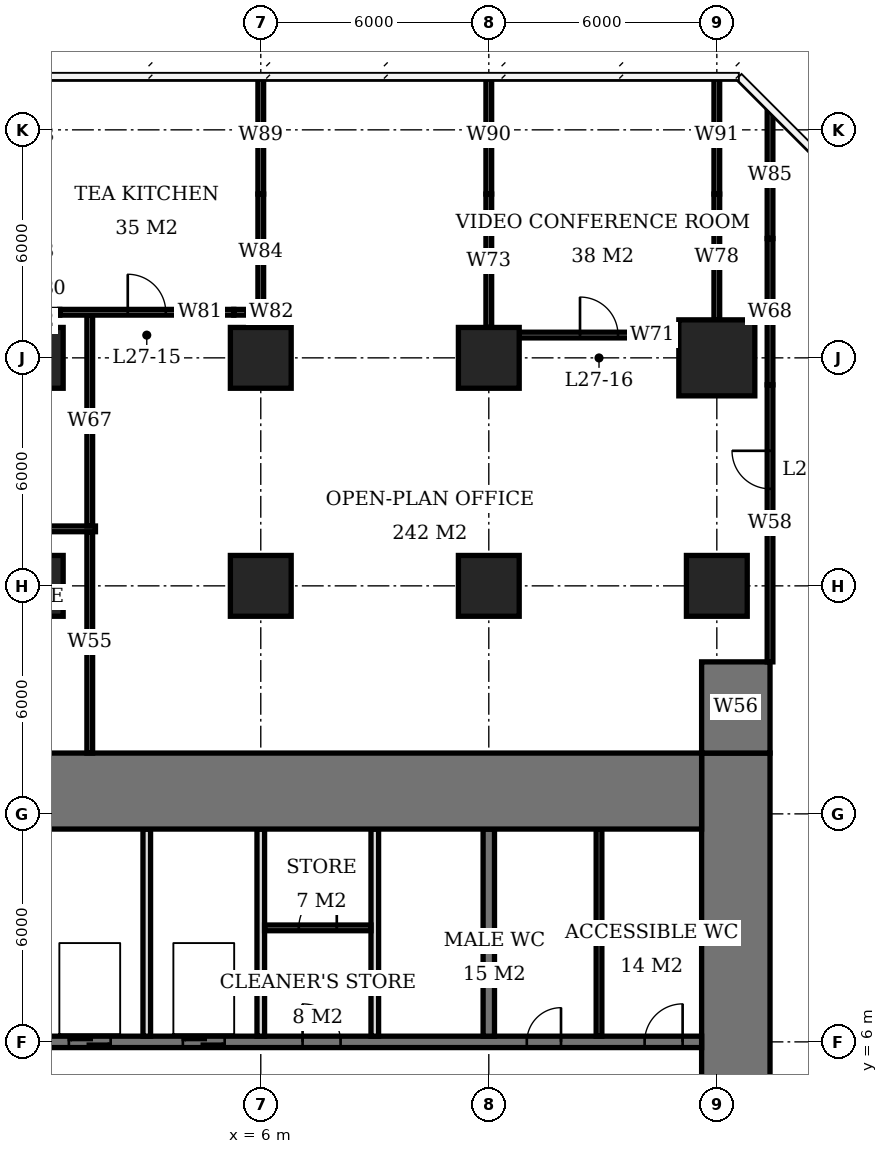
"""IFC4 building model, lengths in metres.
Left out: names, types, materials, properties, quantities, classifications, styles, units other than length and angle.
Written with IfcOpenShell. Run it as: python <this file> out.ifc"""

import sys

from ifc_helpers import new_model, si_unit, direction, frame, frame_2d, origin, origin_2d, place, context, subcontext, project, spatial, rectangle, extrude, element, fill, save


model = new_model("IFC4")
c1 = context("Model", 3, precision=1e-05, world=origin(), true_north=direction((0.0, 1.0)))
c2 = subcontext(c1, "Body", "Model", "MODEL_VIEW")
j1 = project(units=[si_unit("LENGTHUNIT", "METRE"), si_unit("PLANEANGLEUNIT", "RADIAN")], contexts=[c1])
p1 = place(None, origin())
s1 = spatial("IfcSite", under=j1, at=p1, CompositionType="ELEMENT")
p2 = place(p1, origin())
s2 = spatial("IfcBuilding", under=s1, at=p2, CompositionType="ELEMENT")
p3 = place(p2, frame((0.0, 0.0, 113.3)))
s3 = spatial("IfcBuildingStorey", under=s2, at=p3, CompositionType="ELEMENT", Elevation=113.3)
for number, where, z_axis, x_axis in (
    (1, (0.0, 18.0, 0.0), (0.0, 0.0, 1.0), (1.0, 0.0, 0.0)),
    (2, (0.0, 24.0, 0.0), (0.0, 0.0, 1.0), (1.0, 0.0, 0.0)),
    (3, (6.0, 18.0, 0.0), (0.0, 0.0, 1.0), (1.0, 0.0, 0.0)),
    (4, (6.0, 24.0, 0.0), (0.0, 0.0, 1.0), (1.0, 0.0, 0.0)),
    (5, (12.0, 18.0, 0.0), (0.0, 0.0, 1.0), (1.0, 0.0, 0.0)),
    (6, (12.0, 24.0, 0.0), (0.0, 0.0, 1.0), (1.0, 0.0, 0.0)),
    (7, (18.0, 18.0, 0.0), (0.0, 0.0, 1.0), (1.0, 0.0, 0.0)),
):
    element("IfcColumn", number, at=place(p3, frame(where, z_axis=z_axis, x_axis=x_axis)), inside=s3, PredefinedType="COLUMN", context=c2, shape_type="SweptSolid", body=[
        extrude(rectangle(XDim=1.6, YDim=1.6, at=origin_2d()), origin(), (0.0, 0.0, 1.0), 3.9),
    ])
p4 = place(p3, frame((18.0, 24.0, 0.0), z_axis=(0.0, 0.0, 1.0), x_axis=(1.0, 0.0, 0.0)))
e8 = element("IfcColumn", 8, at=p4, inside=s3, PredefinedType="COLUMN", context=c2, shape_type="SweptSolid", body=[
    extrude(rectangle(XDim=2.0, YDim=2.0, at=origin_2d()), origin(), (0.0, 0.0, 1.0), 3.9),
])
p5 = place(p3, frame((-5.6, 12.6, 0.0), z_axis=(0.0, 0.0, 1.0), x_axis=(1.0, 0.0, 0.0)))
e9 = element("IfcWall", 9, at=p5, inside=s3, PredefinedType="SHEAR", context=c2, shape_type="SweptSolid", body=[
    extrude(rectangle(XDim=23.2, YDim=2.0, at=frame_2d((11.6, 0.0))), origin(), (0.0, 0.0, 1.0), 3.9),
])
p6 = place(p3, frame((18.5, -7.6, 0.0), z_axis=(0.0, 0.0, 1.0), x_axis=(0.0, 1.0, 0.0)))
e10 = element("IfcWall", 10, at=p6, inside=s3, PredefinedType="SHEAR", context=c2, shape_type="SweptSolid", body=[
    extrude(rectangle(XDim=21.2, YDim=1.8, at=frame_2d((10.6, 0.0))), origin(), (0.0, 0.0, 1.0), 3.9),
])
p7 = place(p6, frame((9.2, 0.0, 0.0)))
e11 = element("IfcOpeningElement", 11, at=p7, cuts=e10, PredefinedType="OPENING", context=c2, shape_type="SweptSolid", body=[
    extrude(rectangle(XDim=1.8, YDim=2.4, at=frame_2d((0.9, 1.2))), frame((0.0, 0.91, 0.0), z_axis=(0.0, -1.0, 0.0), x_axis=(1.0, 0.0, 0.0)), (0.0, 0.0, 1.0), 1.82),
])
p8 = place(p3, frame((18.5, 13.6, 0.0), z_axis=(0.0, 0.0, 1.0), x_axis=(0.0, 1.0, 0.0)))
e12 = element("IfcWall", 12, at=p8, inside=s3, PredefinedType="SHEAR", context=c2, shape_type="SweptSolid", body=[
    extrude(rectangle(XDim=2.4, YDim=1.8, at=frame_2d((1.2, 0.0))), origin(), (0.0, 0.0, 1.0), 3.9),
])
p9 = place(p3, frame((-0.15, 6.0, 0.0), z_axis=(0.0, 0.0, 1.0), x_axis=(1.0, 0.0, 0.0)))
e13 = element("IfcWall", 13, at=p9, inside=s3, PredefinedType="SHEAR", context=c2, shape_type="SweptSolid", body=[
    extrude(rectangle(XDim=17.75, YDim=0.3, at=frame_2d((8.875, 0.0))), origin(), (0.0, 0.0, 1.0), 3.9),
])
p10 = place(p9, frame((13.15, 0.0, 0.0)))
e14 = element("IfcOpeningElement", 14, at=p10, cuts=e13, PredefinedType="OPENING", context=c2, shape_type="SweptSolid", body=[
    extrude(rectangle(XDim=0.9, YDim=2.1, at=frame_2d((0.45, 1.05))), frame((0.0, 0.16, 0.0), z_axis=(0.0, -1.0, 0.0), x_axis=(1.0, 0.0, 0.0)), (0.0, 0.0, 1.0), 0.32),
])
p11 = place(p9, frame((16.25, 0.0, 0.0)))
e15 = element("IfcOpeningElement", 15, at=p11, cuts=e13, PredefinedType="OPENING", context=c2, shape_type="SweptSolid", body=[
    extrude(rectangle(XDim=1.0, YDim=2.1, at=frame_2d((0.5, 1.05))), frame((0.0, 0.16, 0.0), z_axis=(0.0, -1.0, 0.0), x_axis=(1.0, 0.0, 0.0)), (0.0, 0.0, 1.0), 0.32),
])
p12 = place(p9, frame((7.25, 0.0, 0.0)))
e16 = element("IfcOpeningElement", 16, at=p12, cuts=e13, PredefinedType="OPENING", context=c2, shape_type="SweptSolid", body=[
    extrude(rectangle(XDim=1.0, YDim=2.1, at=frame_2d((0.5, 1.05))), frame((0.0, 0.16, 0.0), z_axis=(0.0, -1.0, 0.0), x_axis=(1.0, 0.0, 0.0)), (0.0, 0.0, 1.0), 0.32),
])
p13 = place(p9, frame((1.1, 0.0, 0.0)))
e17 = element("IfcOpeningElement", 17, at=p13, cuts=e13, PredefinedType="OPENING", context=c2, shape_type="SweptSolid", body=[
    extrude(rectangle(XDim=1.1, YDim=2.1, at=frame_2d((0.55, 1.05))), frame((0.0, 0.16, 0.0), z_axis=(0.0, -1.0, 0.0), x_axis=(1.0, 0.0, 0.0)), (0.0, 0.0, 1.0), 0.32),
])
p14 = place(p9, frame((4.1, 0.0, 0.0)))
e18 = element("IfcOpeningElement", 18, at=p14, cuts=e13, PredefinedType="OPENING", context=c2, shape_type="SweptSolid", body=[
    extrude(rectangle(XDim=1.1, YDim=2.1, at=frame_2d((0.55, 1.05))), frame((0.0, 0.16, 0.0), z_axis=(0.0, -1.0, 0.0), x_axis=(1.0, 0.0, 0.0)), (0.0, 0.0, 1.0), 0.32),
])
p15 = place(p3, frame((12.0, 6.15, 0.0), z_axis=(0.0, 0.0, 1.0), x_axis=(0.0, 1.0, 0.0)))
e19 = element("IfcWall", 19, at=p15, inside=s3, PredefinedType="SHEAR", context=c2, shape_type="SweptSolid", body=[
    extrude(rectangle(XDim=5.45, YDim=0.3, at=frame_2d((2.725, 0.0))), origin(), (0.0, 0.0, 1.0), 3.9),
])
for number, where, z_axis, x_axis in (
    (20, (3.0, 6.15, 0.0), (0.0, 0.0, 1.0), (0.0, 1.0, 0.0)),
    (21, (6.0, 6.15, 0.0), (0.0, 0.0, 1.0), (0.0, 1.0, 0.0)),
    (22, (9.0, 6.15, 0.0), (0.0, 0.0, 1.0), (0.0, 1.0, 0.0)),
):
    element("IfcWall", number, at=place(p3, frame(where, z_axis=z_axis, x_axis=x_axis)), inside=s3, PredefinedType="SOLIDWALL", context=c2, shape_type="SweptSolid", body=[
        extrude(rectangle(XDim=5.45, YDim=0.2, at=frame_2d((2.725, 0.0))), origin(), (0.0, 0.0, 1.0), 3.9),
    ])
p16 = place(p3, frame((14.9, 6.15, 0.0), z_axis=(0.0, 0.0, 1.0), x_axis=(0.0, 1.0, 0.0)))
e23 = element("IfcWall", 23, at=p16, inside=s3, PredefinedType="PLUMBINGWALL", context=c2, shape_type="SweptSolid", body=[
    extrude(rectangle(XDim=5.45, YDim=0.15, at=frame_2d((2.725, 0.0))), origin(), (0.0, 0.0, 1.0), 3.65),
])
p17 = place(p3, frame((6.1, 9.0, 0.0), z_axis=(0.0, 0.0, 1.0), x_axis=(1.0, 0.0, 0.0)))
e24 = element("IfcWall", 24, at=p17, inside=s3, PredefinedType="PARTITIONING", context=c2, shape_type="SweptSolid", body=[
    extrude(rectangle(XDim=2.8, YDim=0.15, at=frame_2d((1.4, 0.0))), origin(), (0.0, 0.0, 1.0), 3.65),
])
p18 = place(p17, frame((0.9, 0.0, 0.0)))
e25 = element("IfcOpeningElement", 25, at=p18, cuts=e24, PredefinedType="OPENING", context=c2, shape_type="SweptSolid", body=[
    extrude(rectangle(XDim=1.0, YDim=2.1, at=frame_2d((0.5, 1.05))), frame((0.0, 0.085, 0.0), z_axis=(0.0, -1.0, 0.0), x_axis=(1.0, 0.0, 0.0)), (0.0, 0.0, 1.0), 0.17),
])
p19 = place(p3, frame((12.8, 24.6, 0.0), z_axis=(0.0, 0.0, 1.0), x_axis=(1.0, 0.0, 0.0)))
e26 = element("IfcWall", 26, at=p19, inside=s3, PredefinedType="PARTITIONING", context=c2, shape_type="SweptSolid", body=[
    extrude(rectangle(XDim=4.2, YDim=0.15, at=frame_2d((2.1, 0.0))), origin(), (0.0, 0.0, 1.0), 3.65),
])
p20 = place(p19, frame((1.6, 0.0, 0.0)))
e27 = element("IfcOpeningElement", 27, at=p20, cuts=e26, PredefinedType="OPENING", context=c2, shape_type="SweptSolid", body=[
    extrude(rectangle(XDim=1.0, YDim=2.1, at=frame_2d((0.5, 1.05))), frame((0.0, 0.085, 0.0), z_axis=(0.0, -1.0, 0.0), x_axis=(1.0, 0.0, 0.0)), (0.0, 0.0, 1.0), 0.17),
])
p21 = place(p3, frame((-0.15, 25.2, 0.0), z_axis=(0.0, 0.0, 1.0), x_axis=(1.0, 0.0, 0.0)))
e28 = element("IfcWall", 28, at=p21, inside=s3, PredefinedType="PARTITIONING", context=c2, shape_type="SweptSolid", body=[
    extrude(rectangle(XDim=0.86, YDim=0.15, at=frame_2d((0.43, 0.0))), origin(), (0.0, 0.0, 1.0), 2.65),
])
p22 = place(p3, frame((0.71, 25.2, 0.0), z_axis=(0.0, 0.0, 1.0), x_axis=(1.0, 0.0, 0.0)))
e29 = element("IfcWall", 29, at=p22, inside=s3, PredefinedType="PARTITIONING", context=c2, shape_type="SweptSolid", body=[
    extrude(rectangle(XDim=4.58, YDim=0.15, at=frame_2d((2.29, 0.0))), origin(), (0.0, 0.0, 1.0), 3.65),
])
p23 = place(p22, frame((1.79, 0.0, 0.0)))
e30 = element("IfcOpeningElement", 30, at=p23, cuts=e29, PredefinedType="OPENING", context=c2, shape_type="SweptSolid", body=[
    extrude(rectangle(XDim=1.0, YDim=2.1, at=frame_2d((0.5, 1.05))), frame((0.0, 0.085, 0.0), z_axis=(0.0, -1.0, 0.0), x_axis=(1.0, 0.0, 0.0)), (0.0, 0.0, 1.0), 0.17),
])
p24 = place(p3, frame((5.29, 25.2, 0.0), z_axis=(0.0, 0.0, 1.0), x_axis=(1.0, 0.0, 0.0)))
e31 = element("IfcWall", 31, at=p24, inside=s3, PredefinedType="PARTITIONING", context=c2, shape_type="SweptSolid", body=[
    extrude(rectangle(XDim=0.785, YDim=0.15, at=frame_2d((0.393, 0.0))), origin(), (0.0, 0.0, 1.0), 2.65),
])
p25 = place(p3, frame((6.0, 25.275, 0.0), z_axis=(0.0, 0.0, 1.0), x_axis=(0.0, 1.0, 0.0)))
e32 = element("IfcWall", 32, at=p25, inside=s3, PredefinedType="PARTITIONING", context=c2, shape_type="SweptSolid", body=[
    extrude(rectangle(XDim=3.035, YDim=0.15, at=frame_2d((1.518, 0.0))), origin(), (0.0, 0.0, 1.0), 2.65),
])
p26 = place(p3, frame((6.0, 28.31, 0.0), z_axis=(0.0, 0.0, 1.0), x_axis=(0.0, 1.0, 0.0)))
e33 = element("IfcWall", 33, at=p26, inside=s3, PredefinedType="PARTITIONING", context=c2, shape_type="SweptSolid", body=[
    extrude(rectangle(XDim=3.09, YDim=0.15, at=frame_2d((1.545, 0.0))), origin(), (0.0, 0.0, 1.0), 3.65),
])
p27 = place(p3, frame((12.0, 24.8, 0.0), z_axis=(0.0, 0.0, 1.0), x_axis=(0.0, 1.0, 0.0)))
e34 = element("IfcWall", 34, at=p27, inside=s3, PredefinedType="PARTITIONING", context=c2, shape_type="SweptSolid", body=[
    extrude(rectangle(XDim=3.51, YDim=0.15, at=frame_2d((1.755, 0.0))), origin(), (0.0, 0.0, 1.0), 2.65),
])
p28 = place(p3, frame((12.0, 28.31, 0.0), z_axis=(0.0, 0.0, 1.0), x_axis=(0.0, 1.0, 0.0)))
e35 = element("IfcWall", 35, at=p28, inside=s3, PredefinedType="PARTITIONING", context=c2, shape_type="SweptSolid", body=[
    extrude(rectangle(XDim=3.09, YDim=0.15, at=frame_2d((1.545, 0.0))), origin(), (0.0, 0.0, 1.0), 3.65),
])
p29 = place(p3, frame((18.0, 25.0, 0.0), z_axis=(0.0, 0.0, 1.0), x_axis=(0.0, 1.0, 0.0)))
e36 = element("IfcWall", 36, at=p29, inside=s3, PredefinedType="PARTITIONING", context=c2, shape_type="SweptSolid", body=[
    extrude(rectangle(XDim=3.31, YDim=0.15, at=frame_2d((1.655, 0.0))), origin(), (0.0, 0.0, 1.0), 2.65),
])
p30 = place(p3, frame((18.0, 28.31, 0.0), z_axis=(0.0, 0.0, 1.0), x_axis=(0.0, 1.0, 0.0)))
e37 = element("IfcWall", 37, at=p30, inside=s3, PredefinedType="PARTITIONING", context=c2, shape_type="SweptSolid", body=[
    extrude(rectangle(XDim=3.09, YDim=0.15, at=frame_2d((1.545, 0.0))), origin(), (0.0, 0.0, 1.0), 3.65),
])
p31 = place(p3, frame((-7.55, 19.5, 0.0), z_axis=(0.0, 0.0, 1.0), x_axis=(1.0, 0.0, 0.0)))
e38 = element("IfcWall", 38, at=p31, inside=s3, PredefinedType="PARTITIONING", context=c2, shape_type="SweptSolid", body=[
    extrude(rectangle(XDim=9.2, YDim=0.15, at=frame_2d((4.6, 0.0))), origin(), (0.0, 0.0, 1.0), 3.65),
])
p32 = place(p3, frame((1.5, 13.6, 0.0), z_axis=(0.0, 0.0, 1.0), x_axis=(0.0, 1.0, 0.0)))
e39 = element("IfcWall", 39, at=p32, inside=s3, PredefinedType="PARTITIONING", context=c2, shape_type="SweptSolid", body=[
    extrude(rectangle(XDim=5.825, YDim=0.15, at=frame_2d((2.913, 0.0))), origin(), (0.0, 0.0, 1.0), 3.65),
])
p33 = place(p3, frame((1.5, 19.575, 0.0), z_axis=(0.0, 0.0, 1.0), x_axis=(0.0, 1.0, 0.0)))
e40 = element("IfcWall", 40, at=p33, inside=s3, PredefinedType="PARTITIONING", context=c2, shape_type="SweptSolid", body=[
    extrude(rectangle(XDim=5.55, YDim=0.15, at=frame_2d((2.775, 0.0))), origin(), (0.0, 0.0, 1.0), 3.65),
])
p34 = place(p3, frame((19.4, 16.0, 0.0), z_axis=(0.0, 0.0, 1.0), x_axis=(0.0, 1.0, 0.0)))
e41 = element("IfcWall", 41, at=p34, inside=s3, PredefinedType="PARTITIONING", context=c2, shape_type="SweptSolid", body=[
    extrude(rectangle(XDim=7.29, YDim=0.15, at=frame_2d((3.645, 0.0))), origin(), (0.0, 0.0, 1.0), 3.65),
])
p35 = place(p34, frame((4.554, 0.0, 0.0)))
e42 = element("IfcOpeningElement", 42, at=p35, cuts=e41, PredefinedType="OPENING", context=c2, shape_type="SweptSolid", body=[
    extrude(rectangle(XDim=1.0, YDim=2.1, at=frame_2d((0.5, 1.05))), frame((0.0, 0.085, 0.0), z_axis=(0.0, -1.0, 0.0), x_axis=(1.0, 0.0, 0.0)), (0.0, 0.0, 1.0), 0.17),
])
p36 = place(p3, frame((19.4, 23.29, 0.0), z_axis=(0.0, 0.0, 1.0), x_axis=(0.0, 1.0, 0.0)))
e43 = element("IfcWall", 43, at=p36, inside=s3, PredefinedType="PARTITIONING", context=c2, shape_type="SweptSolid", body=[
    extrude(rectangle(XDim=3.85, YDim=0.15, at=frame_2d((1.925, 0.0))), origin(), (0.0, 0.0, 1.0), 2.65),
])
p37 = place(p3, frame((19.4, 27.14, 0.0), z_axis=(0.0, 0.0, 1.0), x_axis=(0.0, 1.0, 0.0)))
e44 = element("IfcWall", 44, at=p37, inside=s3, PredefinedType="PARTITIONING", context=c2, shape_type="SweptSolid", body=[
    extrude(rectangle(XDim=3.349, YDim=0.15, at=frame_2d((1.675, 0.0))), origin(), (0.0, 0.0, 1.0), 3.65),
])
p38 = place(p10, origin())
e45 = element("IfcDoor", 45, at=p38, inside=s3, OperationType="SINGLE_SWING_RIGHT", PredefinedType="DOOR", context=c2, shape_type="SweptSolid", body=[
    extrude(rectangle(XDim=0.9, YDim=2.1, at=frame_2d((0.45, 1.05))), frame((0.0, 0.025, 0.0), z_axis=(0.0, -1.0, 0.0), x_axis=(1.0, 0.0, 0.0)), (0.0, 0.0, 1.0), 0.05),
])
fill(e14, e45)
p39 = place(p11, origin())
e46 = element("IfcDoor", 46, at=p39, inside=s3, OperationType="SINGLE_SWING_RIGHT", PredefinedType="DOOR", context=c2, shape_type="SweptSolid", body=[
    extrude(rectangle(XDim=1.0, YDim=2.1, at=frame_2d((0.5, 1.05))), frame((0.0, 0.025, 0.0), z_axis=(0.0, -1.0, 0.0), x_axis=(1.0, 0.0, 0.0)), (0.0, 0.0, 1.0), 0.05),
])
fill(e15, e46)
p40 = place(p18, origin())
e47 = element("IfcDoor", 47, at=p40, inside=s3, OperationType="SINGLE_SWING_RIGHT", PredefinedType="DOOR", context=c2, shape_type="SweptSolid", body=[
    extrude(rectangle(XDim=1.0, YDim=2.1, at=frame_2d((0.5, 1.05))), frame((0.0, 0.025, 0.0), z_axis=(0.0, -1.0, 0.0), x_axis=(1.0, 0.0, 0.0)), (0.0, 0.0, 1.0), 0.05),
])
fill(e25, e47)
p41 = place(p12, origin())
e48 = element("IfcDoor", 48, at=p41, inside=s3, OperationType="SINGLE_SWING_LEFT", PredefinedType="DOOR", context=c2, shape_type="SweptSolid", body=[
    extrude(rectangle(XDim=1.0, YDim=2.1, at=frame_2d((0.5, 1.05))), frame((0.0, 0.025, 0.0), z_axis=(0.0, -1.0, 0.0), x_axis=(1.0, 0.0, 0.0)), (0.0, 0.0, 1.0), 0.05),
])
fill(e16, e48)
p42 = place(p13, origin())
e49 = element("IfcDoor", 49, at=p42, inside=s3, OperationType="DOUBLE_DOOR_SLIDING", PredefinedType="USERDEFINED", context=c2, shape_type="SweptSolid", body=[
    extrude(rectangle(XDim=1.1, YDim=2.1, at=frame_2d((0.55, 1.05))), frame((0.0, 0.025, 0.0), z_axis=(0.0, -1.0, 0.0), x_axis=(1.0, 0.0, 0.0)), (0.0, 0.0, 1.0), 0.05),
])
fill(e17, e49)
p43 = place(p14, origin())
e50 = element("IfcDoor", 50, at=p43, inside=s3, OperationType="DOUBLE_DOOR_SLIDING", PredefinedType="USERDEFINED", context=c2, shape_type="SweptSolid", body=[
    extrude(rectangle(XDim=1.1, YDim=2.1, at=frame_2d((0.55, 1.05))), frame((0.0, 0.025, 0.0), z_axis=(0.0, -1.0, 0.0), x_axis=(1.0, 0.0, 0.0)), (0.0, 0.0, 1.0), 0.05),
])
fill(e18, e50)
p44 = place(p23, origin())
e51 = element("IfcDoor", 51, at=p44, inside=s3, OperationType="SINGLE_SWING_LEFT", PredefinedType="DOOR", context=c2, shape_type="SweptSolid", body=[
    extrude(rectangle(XDim=1.0, YDim=2.1, at=frame_2d((0.5, 1.05))), frame((0.0, 0.025, 0.0), z_axis=(0.0, -1.0, 0.0), x_axis=(1.0, 0.0, 0.0)), (0.0, 0.0, 1.0), 0.05),
])
fill(e30, e51)
p45 = place(p20, origin())
e52 = element("IfcDoor", 52, at=p45, inside=s3, OperationType="SINGLE_SWING_LEFT", PredefinedType="DOOR", context=c2, shape_type="SweptSolid", body=[
    extrude(rectangle(XDim=1.0, YDim=2.1, at=frame_2d((0.5, 1.05))), frame((0.0, 0.025, 0.0), z_axis=(0.0, -1.0, 0.0), x_axis=(1.0, 0.0, 0.0)), (0.0, 0.0, 1.0), 0.05),
])
fill(e27, e52)
p46 = place(p35, origin())
e53 = element("IfcDoor", 53, at=p46, inside=s3, OperationType="SINGLE_SWING_RIGHT", PredefinedType="DOOR", context=c2, shape_type="SweptSolid", body=[
    extrude(rectangle(XDim=1.0, YDim=2.1, at=frame_2d((0.5, 1.05))), frame((0.0, 0.025, 0.0), z_axis=(0.0, -1.0, 0.0), x_axis=(1.0, 0.0, 0.0)), (0.0, 0.0, 1.0), 0.05),
])
fill(e42, e53)
save(model, sys.argv[1])
